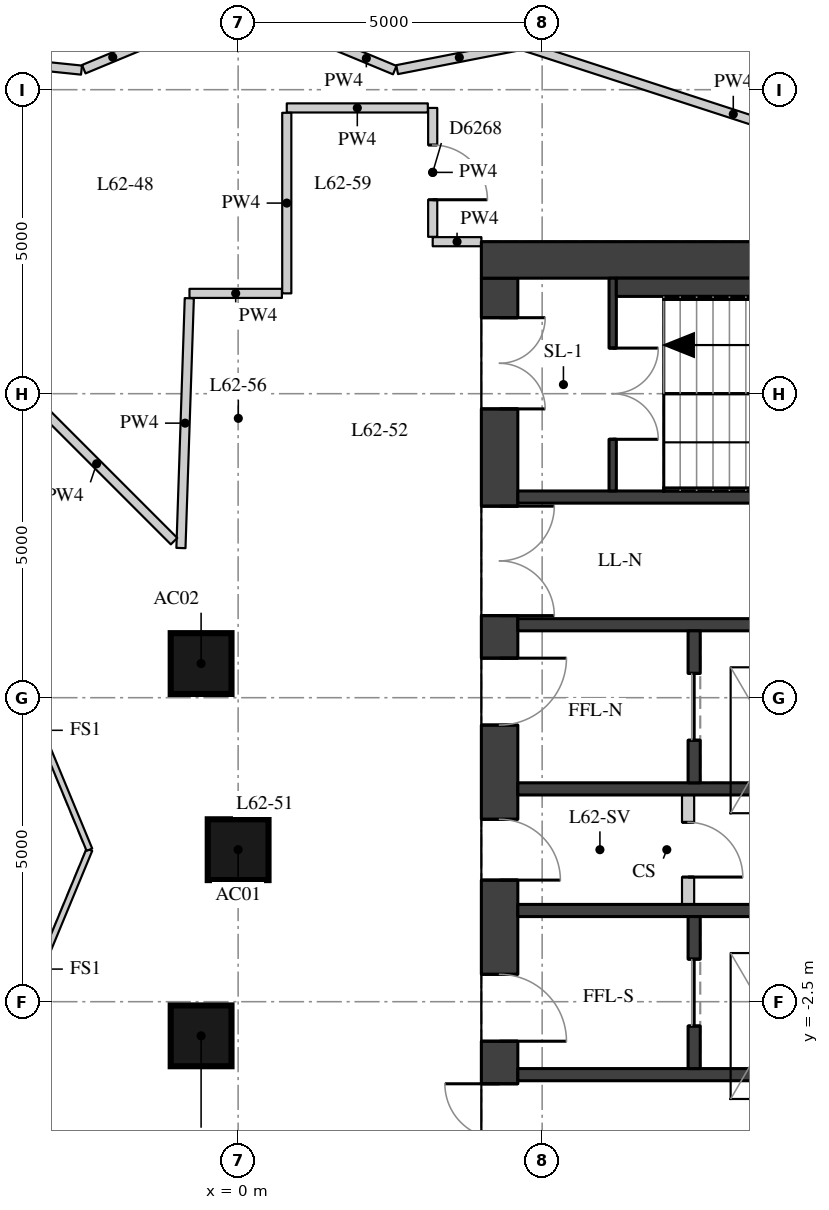
"""IFC4 building model, lengths in metres.
Left out: names, types, materials, properties, quantities, classifications, styles, units other than length and angle.
Written with IfcOpenShell. Run it as: python <this file> out.ifc"""

import sys

from ifc_helpers import new_model, si_unit, direction, frame, frame_2d, origin, origin_2d, place, context, subcontext, project, spatial, rectangle, extrude, element, fill, save


model = new_model("IFC4")
c1 = context("Model", 3, precision=1e-05, world=origin(), true_north=direction((0.0, 1.0)))
c2 = subcontext(c1, "Body", "Model", "MODEL_VIEW")
j1 = project(units=[si_unit("LENGTHUNIT", "METRE"), si_unit("PLANEANGLEUNIT", "RADIAN")], contexts=[c1])
p1 = place(None, origin())
s1 = spatial("IfcSite", under=j1, at=p1, CompositionType="ELEMENT")
p2 = place(p1, origin())
s2 = spatial("IfcBuilding", under=s1, at=p2, CompositionType="ELEMENT")
p3 = place(p2, frame((0.0, 0.0, 218.9)))
s3 = spatial("IfcBuildingStorey", under=s2, at=p3, CompositionType="ELEMENT", Elevation=218.9)
for number, where, z_axis, x_axis in (
    (1, (0.0, 0.0, 0.0), (0.0, 0.0, 1.0), (1.0, 0.0, 0.0)),
    (2, (-0.609, 3.062, 0.0), (0.0, 0.0, 1.0), (1.0, 0.0, 0.0)),
    (3, (-0.609, -3.062, 0.0), (0.0, 0.0, 1.0), (1.0, 0.0, 0.0)),
):
    element("IfcColumn", number, at=place(p3, frame(where, z_axis=z_axis, x_axis=x_axis)), inside=s3, PredefinedType="COLUMN", context=c2, shape_type="SweptSolid", body=[
        extrude(rectangle(XDim=1.0, YDim=1.0, at=origin_2d()), origin(), (0.0, 0.0, 1.0), 3.3),
    ])
p4 = place(p3, frame((4.3, -9.4, 0.0), z_axis=(0.0, 0.0, 1.0), x_axis=(0.0, 1.0, 0.0)))
e4 = element("IfcWall", 4, at=p4, inside=s3, PredefinedType="SHEAR", context=c2, shape_type="SweptSolid", body=[
    extrude(rectangle(XDim=18.8, YDim=0.6, at=frame_2d((9.4, 0.0))), origin(), (0.0, 0.0, 1.0), 3.02),
])
p5 = place(p4, frame((0.65, 0.0, 0.0)))
e5 = element("IfcOpeningElement", 5, at=p5, cuts=e4, PredefinedType="OPENING", context=c2, shape_type="SweptSolid", body=[
    extrude(rectangle(XDim=1.5, YDim=2.1, at=frame_2d((0.75, 1.05))), frame((0.0, 0.31, 0.0), z_axis=(0.0, -1.0, 0.0), x_axis=(1.0, 0.0, 0.0)), (0.0, 0.0, 1.0), 0.62),
])
p6 = place(p4, frame((3.75, 0.0, 0.0)))
e6 = element("IfcOpeningElement", 6, at=p6, cuts=e4, PredefinedType="OPENING", context=c2, shape_type="SweptSolid", body=[
    extrude(rectangle(XDim=1.8, YDim=2.1, at=frame_2d((0.9, 1.05))), frame((0.0, 0.31, 0.0), z_axis=(0.0, -1.0, 0.0), x_axis=(1.0, 0.0, 0.0)), (0.0, 0.0, 1.0), 0.62),
])
p7 = place(p4, frame((6.25, 0.0, 0.0)))
e7 = element("IfcOpeningElement", 7, at=p7, cuts=e4, PredefinedType="OPENING", context=c2, shape_type="SweptSolid", body=[
    extrude(rectangle(XDim=1.1, YDim=2.1, at=frame_2d((0.55, 1.05))), frame((0.0, 0.31, 0.0), z_axis=(0.0, -1.0, 0.0), x_axis=(1.0, 0.0, 0.0)), (0.0, 0.0, 1.0), 0.62),
])
p8 = place(p4, frame((8.9, 0.0, 0.0)))
e8 = element("IfcOpeningElement", 8, at=p8, cuts=e4, PredefinedType="OPENING", context=c2, shape_type="SweptSolid", body=[
    extrude(rectangle(XDim=1.0, YDim=2.1, at=frame_2d((0.5, 1.05))), frame((0.0, 0.31, 0.0), z_axis=(0.0, -1.0, 0.0), x_axis=(1.0, 0.0, 0.0)), (0.0, 0.0, 1.0), 0.62),
])
p9 = place(p4, frame((11.45, 0.0, 0.0)))
e9 = element("IfcOpeningElement", 9, at=p9, cuts=e4, PredefinedType="OPENING", context=c2, shape_type="SweptSolid", body=[
    extrude(rectangle(XDim=1.1, YDim=2.1, at=frame_2d((0.55, 1.05))), frame((0.0, 0.31, 0.0), z_axis=(0.0, -1.0, 0.0), x_axis=(1.0, 0.0, 0.0)), (0.0, 0.0, 1.0), 0.62),
])
p10 = place(p4, frame((13.25, 0.0, 0.0)))
e10 = element("IfcOpeningElement", 10, at=p10, cuts=e4, PredefinedType="OPENING", context=c2, shape_type="SweptSolid", body=[
    extrude(rectangle(XDim=1.8, YDim=2.1, at=frame_2d((0.9, 1.05))), frame((0.0, 0.31, 0.0), z_axis=(0.0, -1.0, 0.0), x_axis=(1.0, 0.0, 0.0)), (0.0, 0.0, 1.0), 0.62),
])
p11 = place(p4, frame((16.65, 0.0, 0.0)))
e11 = element("IfcOpeningElement", 11, at=p11, cuts=e4, PredefinedType="OPENING", context=c2, shape_type="SweptSolid", body=[
    extrude(rectangle(XDim=1.5, YDim=2.1, at=frame_2d((0.75, 1.05))), frame((0.0, 0.31, 0.0), z_axis=(0.0, -1.0, 0.0), x_axis=(1.0, 0.0, 0.0)), (0.0, 0.0, 1.0), 0.62),
])
p12 = place(p3, frame((4.0, 9.7, 0.0), z_axis=(0.0, 0.0, 1.0), x_axis=(1.0, 0.0, 0.0)))
e12 = element("IfcWall", 12, at=p12, inside=s3, PredefinedType="SHEAR", context=c2, shape_type="SweptSolid", body=[
    extrude(rectangle(XDim=12.0, YDim=0.6, at=frame_2d((6.0, 0.0))), origin(), (0.0, 0.0, 1.0), 3.02),
])
p13 = place(p3, frame((4.6, 5.8, 0.0), z_axis=(0.0, 0.0, 1.0), x_axis=(1.0, 0.0, 0.0)))
e13 = element("IfcWall", 13, at=p13, inside=s3, PredefinedType="SHEAR", context=c2, shape_type="SweptSolid", body=[
    extrude(rectangle(XDim=10.8, YDim=0.2, at=frame_2d((5.4, 0.0))), origin(), (0.0, 0.0, 1.0), 3.02),
])
p14 = place(p13, frame((7.05, 0.0, 0.0)))
e14 = element("IfcOpeningElement", 14, at=p14, cuts=e13, PredefinedType="OPENING", context=c2, shape_type="SweptSolid", body=[
    extrude(rectangle(XDim=1.1, YDim=2.1, at=frame_2d((0.55, 1.05))), frame((0.0, 0.11, 0.0), z_axis=(0.0, -1.0, 0.0), x_axis=(1.0, 0.0, 0.0)), (0.0, 0.0, 1.0), 0.22),
])
p15 = place(p13, frame((9.05, 0.0, 0.0)))
e15 = element("IfcOpeningElement", 15, at=p15, cuts=e13, PredefinedType="OPENING", context=c2, shape_type="SweptSolid", body=[
    extrude(rectangle(XDim=1.1, YDim=2.1, at=frame_2d((0.55, 1.05))), frame((0.0, 0.11, 0.0), z_axis=(0.0, -1.0, 0.0), x_axis=(1.0, 0.0, 0.0)), (0.0, 0.0, 1.0), 0.22),
])
p16 = place(p3, frame((4.6, 3.7, 0.0), z_axis=(0.0, 0.0, 1.0), x_axis=(1.0, 0.0, 0.0)))
e16 = element("IfcWall", 16, at=p16, inside=s3, PredefinedType="SHEAR", context=c2, shape_type="SweptSolid", body=[
    extrude(rectangle(XDim=10.8, YDim=0.2, at=frame_2d((5.4, 0.0))), origin(), (0.0, 0.0, 1.0), 3.02),
])
p17 = place(p16, frame((6.6, 0.0, 0.0)))
e17 = element("IfcOpeningElement", 17, at=p17, cuts=e16, PredefinedType="OPENING", context=c2, shape_type="SweptSolid", body=[
    extrude(rectangle(XDim=1.1, YDim=2.1, at=frame_2d((0.55, 1.05))), frame((0.0, 0.11, 0.0), z_axis=(0.0, -1.0, 0.0), x_axis=(1.0, 0.0, 0.0)), (0.0, 0.0, 1.0), 0.22),
])
p18 = place(p16, frame((8.9, 0.0, 0.0)))
e18 = element("IfcOpeningElement", 18, at=p18, cuts=e16, PredefinedType="OPENING", context=c2, shape_type="SweptSolid", body=[
    extrude(rectangle(XDim=1.1, YDim=2.1, at=frame_2d((0.55, 1.05))), frame((0.0, 0.11, 0.0), z_axis=(0.0, -1.0, 0.0), x_axis=(1.0, 0.0, 0.0)), (0.0, 0.0, 1.0), 0.22),
])
for number, where, z_axis, x_axis in (
    (19, (4.6, 1.0, 0.0), (0.0, 0.0, 1.0), (1.0, 0.0, 0.0)),
    (20, (4.6, -1.0, 0.0), (0.0, 0.0, 1.0), (1.0, 0.0, 0.0)),
):
    element("IfcWall", number, at=place(p3, frame(where, z_axis=z_axis, x_axis=x_axis)), inside=s3, PredefinedType="SHEAR", context=c2, shape_type="SweptSolid", body=[
        extrude(rectangle(XDim=10.8, YDim=0.2, at=frame_2d((5.4, 0.0))), origin(), (0.0, 0.0, 1.0), 3.02),
    ])
p19 = place(p3, frame((4.6, -3.7, 0.0), z_axis=(0.0, 0.0, 1.0), x_axis=(1.0, 0.0, 0.0)))
e21 = element("IfcWall", 21, at=p19, inside=s3, PredefinedType="SHEAR", context=c2, shape_type="SweptSolid", body=[
    extrude(rectangle(XDim=10.8, YDim=0.2, at=frame_2d((5.4, 0.0))), origin(), (0.0, 0.0, 1.0), 3.02),
])
p20 = place(p19, frame((6.6, 0.0, 0.0)))
e22 = element("IfcOpeningElement", 22, at=p20, cuts=e21, PredefinedType="OPENING", context=c2, shape_type="SweptSolid", body=[
    extrude(rectangle(XDim=1.1, YDim=2.1, at=frame_2d((0.55, 1.05))), frame((0.0, 0.11, 0.0), z_axis=(0.0, -1.0, 0.0), x_axis=(1.0, 0.0, 0.0)), (0.0, 0.0, 1.0), 0.22),
])
p21 = place(p19, frame((8.9, 0.0, 0.0)))
e23 = element("IfcOpeningElement", 23, at=p21, cuts=e21, PredefinedType="OPENING", context=c2, shape_type="SweptSolid", body=[
    extrude(rectangle(XDim=1.1, YDim=2.1, at=frame_2d((0.55, 1.05))), frame((0.0, 0.11, 0.0), z_axis=(0.0, -1.0, 0.0), x_axis=(1.0, 0.0, 0.0)), (0.0, 0.0, 1.0), 0.22),
])
p22 = place(p3, frame((7.5, 1.1, 0.0), z_axis=(0.0, 0.0, 1.0), x_axis=(0.0, 1.0, 0.0)))
e24 = element("IfcWall", 24, at=p22, inside=s3, PredefinedType="SHEAR", context=c2, shape_type="SweptSolid", body=[
    extrude(rectangle(XDim=2.5, YDim=0.2, at=frame_2d((1.25, 0.0))), origin(), (0.0, 0.0, 1.0), 3.02),
])
p23 = place(p22, frame((0.7, 0.0, 0.0)))
e25 = element("IfcOpeningElement", 25, at=p23, cuts=e24, PredefinedType="OPENING", context=c2, shape_type="SweptSolid", body=[
    extrude(rectangle(XDim=1.1, YDim=2.1, at=frame_2d((0.55, 1.05))), frame((0.0, 0.11, 0.0), z_axis=(0.0, -1.0, 0.0), x_axis=(1.0, 0.0, 0.0)), (0.0, 0.0, 1.0), 0.22),
])
p24 = place(p3, frame((7.5, -3.6, 0.0), z_axis=(0.0, 0.0, 1.0), x_axis=(0.0, 1.0, 0.0)))
e26 = element("IfcWall", 26, at=p24, inside=s3, PredefinedType="SHEAR", context=c2, shape_type="SweptSolid", body=[
    extrude(rectangle(XDim=2.5, YDim=0.2, at=frame_2d((1.25, 0.0))), origin(), (0.0, 0.0, 1.0), 3.02),
])
p25 = place(p24, frame((0.7, 0.0, 0.0)))
e27 = element("IfcOpeningElement", 27, at=p25, cuts=e26, PredefinedType="OPENING", context=c2, shape_type="SweptSolid", body=[
    extrude(rectangle(XDim=1.1, YDim=2.1, at=frame_2d((0.55, 1.05))), frame((0.0, 0.11, 0.0), z_axis=(0.0, -1.0, 0.0), x_axis=(1.0, 0.0, 0.0)), (0.0, 0.0, 1.0), 0.22),
])
p26 = place(p3, frame((6.16, 5.9, 0.0), z_axis=(0.0, 0.0, 1.0), x_axis=(0.0, 1.0, 0.0)))
e28 = element("IfcWall", 28, at=p26, inside=s3, PredefinedType="SHEAR", context=c2, shape_type="SweptSolid", body=[
    extrude(rectangle(XDim=3.5, YDim=0.12, at=frame_2d((1.75, 0.0))), origin(), (0.0, 0.0, 1.0), 3.02),
])
p27 = place(p26, frame((0.85, 0.0, 0.0)))
e29 = element("IfcOpeningElement", 29, at=p27, cuts=e28, PredefinedType="OPENING", context=c2, shape_type="SweptSolid", body=[
    extrude(rectangle(XDim=1.5, YDim=2.1, at=frame_2d((0.75, 1.05))), frame((0.0, 0.07, 0.0), z_axis=(0.0, -1.0, 0.0), x_axis=(1.0, 0.0, 0.0)), (0.0, 0.0, 1.0), 0.14),
])
p28 = place(p3, frame((7.4, -0.9, 0.0), z_axis=(0.0, 0.0, 1.0), x_axis=(0.0, 1.0, 0.0)))
e30 = element("IfcWall", 30, at=p28, inside=s3, PredefinedType="PARTITIONING", context=c2, shape_type="SweptSolid", body=[
    extrude(rectangle(XDim=1.8, YDim=0.2, at=frame_2d((0.9, 0.0))), origin(), (0.0, 0.0, 1.0), 3.02),
])
p29 = place(p28, frame((0.45, 0.0, 0.0)))
e31 = element("IfcOpeningElement", 31, at=p29, cuts=e30, PredefinedType="OPENING", context=c2, shape_type="SweptSolid", body=[
    extrude(rectangle(XDim=0.9, YDim=2.1, at=frame_2d((0.45, 1.05))), frame((0.0, 0.11, 0.0), z_axis=(0.0, -1.0, 0.0), x_axis=(1.0, 0.0, 0.0)), (0.0, 0.0, 1.0), 0.22),
])
p30 = place(p3, frame((6.22, 9.25, 0.0), z_axis=(0.0, 0.0, 1.0), x_axis=(1.0, 0.0, 0.0)))
e32 = element("IfcWall", 32, at=p30, inside=s3, PredefinedType="PARTITIONING", context=c2, shape_type="SweptSolid", body=[
    extrude(rectangle(XDim=4.88, YDim=0.3, at=frame_2d((2.44, 0.0))), origin(), (0.0, 0.0, 1.0), 3.02),
])
p31 = place(p3, frame((0.795, 16.169, 0.0), z_axis=(0.0, 0.0, 1.0), x_axis=(0.950998491074, -0.309195520626, 0.0)))
e33 = element("IfcWall", 33, at=p31, inside=s3, PredefinedType="PARTITIONING", context=c2, shape_type="SweptSolid", body=[
    extrude(rectangle(XDim=12.357, YDim=0.2, at=frame_2d((6.179, 0.0))), origin(), (0.0, 0.0, 1.0), 3.02),
])
p32 = place(p31, frame((8.496, 0.0, 0.0)))
e34 = element("IfcOpeningElement", 34, at=p32, cuts=e33, PredefinedType="OPENING", context=c2, shape_type="SweptSolid", body=[
    extrude(rectangle(XDim=1.1, YDim=2.1, at=frame_2d((0.55, 1.05))), frame((0.0, 0.11, 0.0), z_axis=(0.0, -1.0, 0.0), x_axis=(1.0, 0.0, 0.0)), (0.0, 0.0, 1.0), 0.22),
])
p33 = place(p31, frame((4.169, 0.0, 0.0)))
e35 = element("IfcOpeningElement", 35, at=p33, cuts=e33, PredefinedType="OPENING", context=c2, shape_type="SweptSolid", body=[
    extrude(rectangle(XDim=0.9, YDim=2.1, at=frame_2d((0.45, 1.05))), frame((0.0, 0.11, 0.0), z_axis=(0.0, -1.0, 0.0), x_axis=(1.0, 0.0, 0.0)), (0.0, 0.0, 1.0), 0.22),
])
p34 = place(p31, frame((0.747, 0.0, 0.0)))
e36 = element("IfcOpeningElement", 36, at=p34, cuts=e33, PredefinedType="OPENING", context=c2, shape_type="SweptSolid", body=[
    extrude(rectangle(XDim=0.9, YDim=2.1, at=frame_2d((0.45, 1.05))), frame((0.0, 0.11, 0.0), z_axis=(0.0, -1.0, 0.0), x_axis=(1.0, 0.0, 0.0)), (0.0, 0.0, 1.0), 0.22),
])
p35 = place(p3, frame((4.001, 10.0, 0.0), z_axis=(0.0, 0.0, 1.0), x_axis=(-1.0, 0.0, 0.0)))
e37 = element("IfcWall", 37, at=p35, inside=s3, PredefinedType="PARTITIONING", context=c2, shape_type="SweptSolid", body=[
    extrude(rectangle(XDim=0.801, YDim=0.15, at=frame_2d((0.4, 0.0))), origin(), (0.0, 0.0, 1.0), 3.02),
])
p36 = place(p3, frame((3.2, 10.08, 0.0), z_axis=(0.0, 0.0, 1.0), x_axis=(0.0, 1.0, 0.0)))
e38 = element("IfcWall", 38, at=p36, inside=s3, PredefinedType="PARTITIONING", context=c2, shape_type="SweptSolid", body=[
    extrude(rectangle(XDim=2.12, YDim=0.15, at=frame_2d((1.06, 0.0))), origin(), (0.0, 0.0, 1.0), 3.02),
])
p37 = place(p36, frame((0.61, 0.0, 0.0)))
e39 = element("IfcOpeningElement", 39, at=p37, cuts=e38, PredefinedType="OPENING", context=c2, shape_type="SweptSolid", body=[
    extrude(rectangle(XDim=0.9, YDim=2.1, at=frame_2d((0.45, 1.05))), frame((0.0, 0.085, 0.0), z_axis=(0.0, -1.0, 0.0), x_axis=(1.0, 0.0, 0.0)), (0.0, 0.0, 1.0), 0.17),
])
p38 = place(p3, frame((3.12, 12.2, 0.0), z_axis=(0.0, 0.0, 1.0), x_axis=(-1.0, 0.0, 0.0)))
e40 = element("IfcWall", 40, at=p38, inside=s3, PredefinedType="PARTITIONING", context=c2, shape_type="SweptSolid", body=[
    extrude(rectangle(XDim=2.32, YDim=0.15, at=frame_2d((1.16, 0.0))), origin(), (0.0, 0.0, 1.0), 3.02),
])
p39 = place(p3, frame((0.8, 12.12, 0.0), z_axis=(0.0, 0.0, 1.0), x_axis=(0.0, -1.0, 0.0)))
e41 = element("IfcWall", 41, at=p39, inside=s3, PredefinedType="PARTITIONING", context=c2, shape_type="SweptSolid", body=[
    extrude(rectangle(XDim=2.97, YDim=0.15, at=frame_2d((1.485, 0.0))), origin(), (0.0, 0.0, 1.0), 3.02),
])
p40 = place(p3, frame((0.72, 9.15, 0.0), z_axis=(0.0, 0.0, 1.0), x_axis=(-1.0, 0.0, 0.0)))
e42 = element("IfcWall", 42, at=p40, inside=s3, PredefinedType="PARTITIONING", context=c2, shape_type="SweptSolid", body=[
    extrude(rectangle(XDim=1.52, YDim=0.15, at=frame_2d((0.76, 0.0))), origin(), (0.0, 0.0, 1.0), 3.02),
])
p41 = place(p3, frame((-0.803, 9.07, 0.0), z_axis=(0.0, 0.0, 1.0), x_axis=(-0.033496761224, -0.999438826036, 0.0)))
e43 = element("IfcWall", 43, at=p41, inside=s3, PredefinedType="PARTITIONING", context=c2, shape_type="SweptSolid", body=[
    extrude(rectangle(XDim=4.111, YDim=0.15, at=frame_2d((2.055, 0.0))), origin(), (0.0, 0.0, 1.0), 3.02),
])
p42 = place(p3, frame((-1.054, 5.075, 0.0), z_axis=(0.0, 0.0, 1.0), x_axis=(-0.707106781187, 0.707106781187, 0.0)))
e44 = element("IfcWall", 44, at=p42, inside=s3, PredefinedType="PARTITIONING", context=c2, shape_type="SweptSolid", body=[
    extrude(rectangle(XDim=3.601, YDim=0.15, at=frame_2d((1.8, 0.0))), origin(), (0.0, 0.0, 1.0), 3.02),
])
p43 = place(p3, frame((-5.229, 13.095, 0.0), z_axis=(0.0, 0.0, 1.0), x_axis=(0.994729851422, -0.102530593925, 0.0)))
e45 = element("IfcWall", 45, at=p43, inside=s3, PredefinedType="PARTITIONING", context=c2, shape_type="SweptSolid", body=[
    extrude(rectangle(XDim=2.667, YDim=0.15, at=frame_2d((1.333, 0.0))), origin(), (0.0, 0.0, 1.0), 3.02),
])
p44 = place(p3, frame((-2.539, 12.837, 0.0), z_axis=(0.0, 0.0, 1.0), x_axis=(0.923768662954, 0.382950985565, 0.0)))
e46 = element("IfcWall", 46, at=p44, inside=s3, PredefinedType="PARTITIONING", context=c2, shape_type="SweptSolid", body=[
    extrude(rectangle(XDim=1.031, YDim=0.15, at=frame_2d((0.516, 0.0))), origin(), (0.0, 0.0, 1.0), 3.02),
])
p45 = place(p3, frame((1.641, 13.209, 0.0), z_axis=(0.0, 0.0, 1.0), x_axis=(0.923725449546, -0.383055209937, 0.0)))
e47 = element("IfcWall", 47, at=p45, inside=s3, PredefinedType="PARTITIONING", context=c2, shape_type="SweptSolid", body=[
    extrude(rectangle(XDim=1.011, YDim=0.15, at=frame_2d((0.506, 0.0))), origin(), (0.0, 0.0, 1.0), 3.02),
])
p46 = place(p3, frame((2.615, 12.83, 0.0), z_axis=(0.0, 0.0, 1.0), x_axis=(0.98140512634, 0.191947852276, 0.0)))
e48 = element("IfcWall", 48, at=p46, inside=s3, PredefinedType="PARTITIONING", context=c2, shape_type="SweptSolid", body=[
    extrude(rectangle(XDim=2.085, YDim=0.15, at=frame_2d((1.042, 0.0))), origin(), (0.0, 0.0, 1.0), 3.02),
])
p47 = place(p3, frame((4.699, 13.218, 0.0), z_axis=(0.0, 0.0, 1.0), x_axis=(0.95099963578, -0.30919199981, 0.0)))
e49 = element("IfcWall", 49, at=p47, inside=s3, PredefinedType="PARTITIONING", context=c2, shape_type="SweptSolid", body=[
    extrude(rectangle(XDim=7.244, YDim=0.15, at=frame_2d((3.622, 0.0))), origin(), (0.0, 0.0, 1.0), 3.02),
])
for number, where, z_axis, x_axis in (
    (50, (-2.446, 0.0, 0.0), (0.0, 0.0, 1.0), (-0.383, -0.924, 0.0)),
    (51, (-4.073, 3.927, 0.0), (0.0, 0.0, 1.0), (0.383, -0.924, 0.0)),
):
    element("IfcWall", number, at=place(p3, frame(where, z_axis=z_axis, x_axis=x_axis)), inside=s3, PredefinedType="PARTITIONING", context=c2, shape_type="SweptSolid", body=[
        extrude(rectangle(XDim=4.251, YDim=0.1, at=frame_2d((2.125, 0.0))), origin(), (0.0, 0.0, 1.0), 3.02),
    ])
p48 = place(p6, origin())
e52 = element("IfcDoor", 52, at=p48, inside=s3, OperationType="DOUBLE_DOOR_SINGLE_SWING", PredefinedType="DOOR", context=c2, shape_type="SweptSolid", body=[
    extrude(rectangle(XDim=1.8, YDim=2.1, at=frame_2d((0.9, 1.05))), frame((0.0, 0.025, 0.0), z_axis=(0.0, -1.0, 0.0), x_axis=(1.0, 0.0, 0.0)), (0.0, 0.0, 1.0), 0.05),
])
fill(e6, e52)
p49 = place(p7, origin())
e53 = element("IfcDoor", 53, at=p49, inside=s3, OperationType="SINGLE_SWING_RIGHT", PredefinedType="DOOR", context=c2, shape_type="SweptSolid", body=[
    extrude(rectangle(XDim=1.1, YDim=2.1, at=frame_2d((0.55, 1.05))), frame((0.0, 0.025, 0.0), z_axis=(0.0, -1.0, 0.0), x_axis=(1.0, 0.0, 0.0)), (0.0, 0.0, 1.0), 0.05),
])
fill(e7, e53)
p50 = place(p8, origin())
e54 = element("IfcDoor", 54, at=p50, inside=s3, OperationType="SINGLE_SWING_RIGHT", PredefinedType="DOOR", context=c2, shape_type="SweptSolid", body=[
    extrude(rectangle(XDim=1.0, YDim=2.1, at=frame_2d((0.5, 1.05))), frame((0.0, 0.025, 0.0), z_axis=(0.0, -1.0, 0.0), x_axis=(1.0, 0.0, 0.0)), (0.0, 0.0, 1.0), 0.05),
])
fill(e8, e54)
p51 = place(p9, origin())
e55 = element("IfcDoor", 55, at=p51, inside=s3, OperationType="SINGLE_SWING_LEFT", PredefinedType="DOOR", context=c2, shape_type="SweptSolid", body=[
    extrude(rectangle(XDim=1.1, YDim=2.1, at=frame_2d((0.55, 1.05))), frame((0.0, 0.025, 0.0), z_axis=(0.0, -1.0, 0.0), x_axis=(1.0, 0.0, 0.0)), (0.0, 0.0, 1.0), 0.05),
])
fill(e9, e55)
p52 = place(p10, origin())
e56 = element("IfcDoor", 56, at=p52, inside=s3, OperationType="DOUBLE_DOOR_SINGLE_SWING", PredefinedType="DOOR", context=c2, shape_type="SweptSolid", body=[
    extrude(rectangle(XDim=1.8, YDim=2.1, at=frame_2d((0.9, 1.05))), frame((0.0, 0.025, 0.0), z_axis=(0.0, -1.0, 0.0), x_axis=(1.0, 0.0, 0.0)), (0.0, 0.0, 1.0), 0.05),
])
fill(e10, e56)
p53 = place(p11, origin())
e57 = element("IfcDoor", 57, at=p53, inside=s3, OperationType="DOUBLE_DOOR_SINGLE_SWING", PredefinedType="DOOR", context=c2, shape_type="SweptSolid", body=[
    extrude(rectangle(XDim=1.5, YDim=2.1, at=frame_2d((0.75, 1.05))), frame((0.0, 0.025, 0.0), z_axis=(0.0, -1.0, 0.0), x_axis=(1.0, 0.0, 0.0)), (0.0, 0.0, 1.0), 0.05),
])
fill(e11, e57)
p54 = place(p27, origin())
e58 = element("IfcDoor", 58, at=p54, inside=s3, OperationType="DOUBLE_DOOR_SINGLE_SWING", PredefinedType="DOOR", context=c2, shape_type="SweptSolid", body=[
    extrude(rectangle(XDim=1.5, YDim=2.1, at=frame_2d((0.75, 1.05))), frame((0.0, 0.025, 0.0), z_axis=(0.0, -1.0, 0.0), x_axis=(1.0, 0.0, 0.0)), (0.0, 0.0, 1.0), 0.05),
])
fill(e29, e58)
p55 = place(p23, origin())
e59 = element("IfcDoor", 59, at=p55, inside=s3, OperationType="DOUBLE_DOOR_SLIDING", PredefinedType="DOOR", context=c2, shape_type="SweptSolid", body=[
    extrude(rectangle(XDim=1.1, YDim=2.1, at=frame_2d((0.55, 1.05))), frame((0.0, 0.025, 0.0), z_axis=(0.0, -1.0, 0.0), x_axis=(1.0, 0.0, 0.0)), (0.0, 0.0, 1.0), 0.05),
])
fill(e25, e59)
p56 = place(p25, origin())
e60 = element("IfcDoor", 60, at=p56, inside=s3, OperationType="DOUBLE_DOOR_SLIDING", PredefinedType="DOOR", context=c2, shape_type="SweptSolid", body=[
    extrude(rectangle(XDim=1.1, YDim=2.1, at=frame_2d((0.55, 1.05))), frame((0.0, 0.025, 0.0), z_axis=(0.0, -1.0, 0.0), x_axis=(1.0, 0.0, 0.0)), (0.0, 0.0, 1.0), 0.05),
])
fill(e27, e60)
p57 = place(p29, origin())
e61 = element("IfcDoor", 61, at=p57, inside=s3, OperationType="SINGLE_SWING_RIGHT", PredefinedType="DOOR", context=c2, shape_type="SweptSolid", body=[
    extrude(rectangle(XDim=0.9, YDim=2.1, at=frame_2d((0.45, 1.05))), frame((0.0, 0.025, 0.0), z_axis=(0.0, -1.0, 0.0), x_axis=(1.0, 0.0, 0.0)), (0.0, 0.0, 1.0), 0.05),
])
fill(e31, e61)
p58 = place(p37, origin())
e62 = element("IfcDoor", 62, at=p58, inside=s3, OperationType="SINGLE_SWING_RIGHT", PredefinedType="DOOR", context=c2, shape_type="SweptSolid", body=[
    extrude(rectangle(XDim=0.9, YDim=2.1, at=frame_2d((0.45, 1.05))), frame((0.0, 0.025, 0.0), z_axis=(0.0, -1.0, 0.0), x_axis=(1.0, 0.0, 0.0)), (0.0, 0.0, 1.0), 0.05),
])
fill(e39, e62)
save(model, sys.argv[1])
